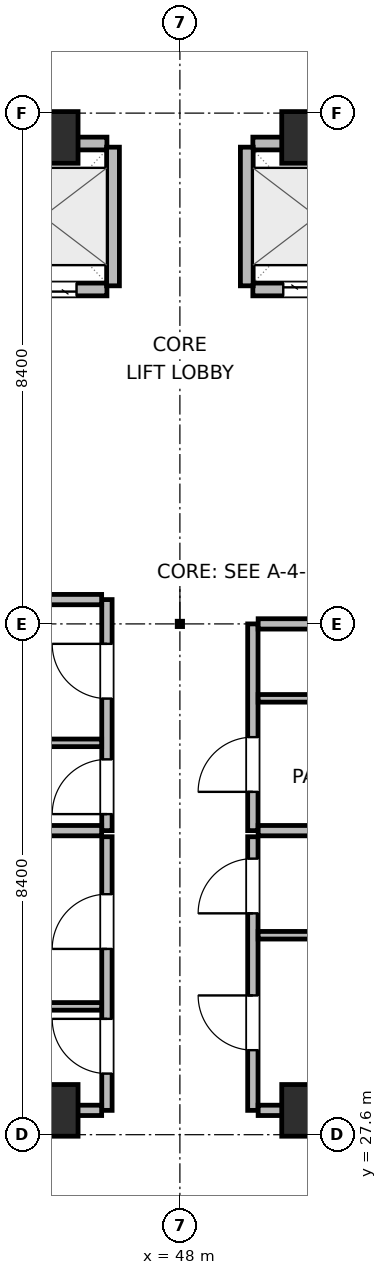
"""IFC4 building model, lengths in metres.
Left out: names, types, materials, properties, quantities, classifications, styles, units other than length and angle.
Written with IfcOpenShell. Run it as: python <this file> out.ifc"""

import sys

from ifc_helpers import new_model, si_unit, direction, frame, frame_2d, origin, origin_2d, place, context, subcontext, project, spatial, rectangle, extrude, element, fill, save


model = new_model("IFC4")
c1 = context("Model", 3, precision=1e-05, world=origin(), true_north=direction((0.0, 1.0)))
c2 = subcontext(c1, "Body", "Model", "MODEL_VIEW")
j1 = project(units=[si_unit("LENGTHUNIT", "METRE"), si_unit("PLANEANGLEUNIT", "RADIAN")], contexts=[c1])
p1 = place(None, origin())
s1 = spatial("IfcSite", under=j1, at=p1, CompositionType="ELEMENT")
p2 = place(p1, origin())
s2 = spatial("IfcBuilding", under=s1, at=p2, CompositionType="ELEMENT")
p3 = place(p2, frame((0.0, 0.0, 170.1)))
s3 = spatial("IfcBuildingStorey", under=s2, at=p3, CompositionType="ELEMENT", Elevation=170.1)
for number, where, z_axis, x_axis in (
    (1, (45.9, 28.0, 0.0), (0.0, 0.0, 1.0), (1.0, 0.0, 0.0)),
    (2, (50.1, 28.0, 0.0), (0.0, 0.0, 1.0), (1.0, 0.0, 0.0)),
    (3, (45.9, 44.0, 0.0), (0.0, 0.0, 1.0), (1.0, 0.0, 0.0)),
    (4, (50.1, 44.0, 0.0), (0.0, 0.0, 1.0), (1.0, 0.0, 0.0)),
):
    element("IfcColumn", number, at=place(p3, frame(where, z_axis=z_axis, x_axis=x_axis)), inside=s3, PredefinedType="COLUMN", context=c2, shape_type="SweptSolid", body=[
        extrude(rectangle(XDim=0.85, YDim=0.85, at=origin_2d()), origin(), (0.0, 0.0, 1.0), 3.9),
    ])
p4 = place(p3, frame((44.7, 41.5, 0.0), z_axis=(0.0, 0.0, 1.0), x_axis=(1.0, 0.0, 0.0)))
e5 = element("IfcWall", 5, at=p4, inside=s3, PredefinedType="PARTITIONING", context=c2, shape_type="SweptSolid", body=[
    extrude(rectangle(XDim=2.1, YDim=0.21, at=frame_2d((1.05, 0.0))), origin(), (0.0, 0.0, 1.0), 3.68),
])
p5 = place(p4, frame((0.5, 0.0, 0.0)))
e6 = element("IfcOpeningElement", 6, at=p5, cuts=e5, PredefinedType="OPENING", context=c2, shape_type="SweptSolid", body=[
    extrude(rectangle(XDim=1.1, YDim=2.04, at=frame_2d((0.55, 1.02))), frame((0.0, 0.115, 0.0), z_axis=(0.0, -1.0, 0.0), x_axis=(1.0, 0.0, 0.0)), (0.0, 0.0, 1.0), 0.23),
])
p6 = place(p3, frame((44.7, 43.9, 0.0), z_axis=(0.0, 0.0, 1.0), x_axis=(1.0, 0.0, 0.0)))
e7 = element("IfcWall", 7, at=p6, inside=s3, PredefinedType="PARTITIONING", context=c2, shape_type="SweptSolid", body=[
    extrude(rectangle(XDim=2.1, YDim=0.21, at=frame_2d((1.05, 0.0))), origin(), (0.0, 0.0, 1.0), 2.765),
])
p7 = place(p3, frame((46.9, 41.56, 0.0), z_axis=(0.0, 0.0, 1.0), x_axis=(0.0, 1.0, 0.0)))
e8 = element("IfcWall", 8, at=p7, inside=s3, PredefinedType="PARTITIONING", context=c2, shape_type="SweptSolid", body=[
    extrude(rectangle(XDim=2.28, YDim=0.21, at=frame_2d((1.14, 0.0))), origin(), (0.0, 0.0, 1.0), 3.68),
])
p8 = place(p3, frame((49.2, 41.5, 0.0), z_axis=(0.0, 0.0, 1.0), x_axis=(1.0, 0.0, 0.0)))
e9 = element("IfcWall", 9, at=p8, inside=s3, PredefinedType="PARTITIONING", context=c2, shape_type="SweptSolid", body=[
    extrude(rectangle(XDim=2.1, YDim=0.21, at=frame_2d((1.05, 0.0))), origin(), (0.0, 0.0, 1.0), 3.68),
])
p9 = place(p8, frame((0.5, 0.0, 0.0)))
e10 = element("IfcOpeningElement", 10, at=p9, cuts=e9, PredefinedType="OPENING", context=c2, shape_type="SweptSolid", body=[
    extrude(rectangle(XDim=1.1, YDim=2.04, at=frame_2d((0.55, 1.02))), frame((0.0, 0.115, 0.0), z_axis=(0.0, -1.0, 0.0), x_axis=(1.0, 0.0, 0.0)), (0.0, 0.0, 1.0), 0.23),
])
p10 = place(p3, frame((49.2, 43.9, 0.0), z_axis=(0.0, 0.0, 1.0), x_axis=(1.0, 0.0, 0.0)))
e11 = element("IfcWall", 11, at=p10, inside=s3, PredefinedType="PARTITIONING", context=c2, shape_type="SweptSolid", body=[
    extrude(rectangle(XDim=2.1, YDim=0.21, at=frame_2d((1.05, 0.0))), origin(), (0.0, 0.0, 1.0), 2.765),
])
p11 = place(p3, frame((49.1, 41.56, 0.0), z_axis=(0.0, 0.0, 1.0), x_axis=(0.0, 1.0, 0.0)))
e12 = element("IfcWall", 12, at=p11, inside=s3, PredefinedType="PARTITIONING", context=c2, shape_type="SweptSolid", body=[
    extrude(rectangle(XDim=2.28, YDim=0.21, at=frame_2d((1.14, 0.0))), origin(), (0.0, 0.0, 1.0), 3.68),
])
p12 = place(p3, frame((46.8, 32.6, 0.0), z_axis=(0.0, 0.0, 1.0), x_axis=(0.0, 1.0, 0.0)))
e13 = element("IfcWall", 13, at=p12, inside=s3, PredefinedType="PARTITIONING", context=c2, shape_type="SweptSolid", body=[
    extrude(rectangle(XDim=3.8, YDim=0.17, at=frame_2d((1.9, 0.0))), origin(), (0.0, 0.0, 1.0), 3.68),
])
p13 = place(p12, frame((0.272, 0.0, 0.0)))
e14 = element("IfcOpeningElement", 14, at=p13, cuts=e13, PredefinedType="OPENING", context=c2, shape_type="SweptSolid", body=[
    extrude(rectangle(XDim=0.9, YDim=2.02, at=frame_2d((0.45, 1.01))), frame((0.0, 0.095, 0.0), z_axis=(0.0, -1.0, 0.0), x_axis=(1.0, 0.0, 0.0)), (0.0, 0.0, 1.0), 0.19),
])
p14 = place(p12, frame((2.172, 0.0, 0.0)))
e15 = element("IfcOpeningElement", 15, at=p14, cuts=e13, PredefinedType="OPENING", context=c2, shape_type="SweptSolid", body=[
    extrude(rectangle(XDim=0.9, YDim=2.02, at=frame_2d((0.45, 1.01))), frame((0.0, 0.095, 0.0), z_axis=(0.0, -1.0, 0.0), x_axis=(1.0, 0.0, 0.0)), (0.0, 0.0, 1.0), 0.19),
])
for number, where, z_axis, x_axis in (
    (16, (43.8, 32.6, 0.0), (0.0, 0.0, 1.0), (1.0, 0.0, 0.0)),
    (17, (43.8, 36.4, 0.0), (0.0, 0.0, 1.0), (1.0, 0.0, 0.0)),
):
    element("IfcWall", number, at=place(p3, frame(where, z_axis=z_axis, x_axis=x_axis)), inside=s3, PredefinedType="PARTITIONING", context=c2, shape_type="SweptSolid", body=[
        extrude(rectangle(XDim=2.913, YDim=0.17, at=frame_2d((1.457, 0.0))), origin(), (0.0, 0.0, 1.0), 3.68),
    ])
p15 = place(p3, frame((43.8, 34.044, 0.0), z_axis=(0.0, 0.0, 1.0), x_axis=(1.0, 0.0, 0.0)))
e18 = element("IfcWall", 18, at=p15, inside=s3, PredefinedType="PARTITIONING", context=c2, shape_type="SweptSolid", body=[
    extrude(rectangle(XDim=2.913, YDim=0.125, at=frame_2d((1.457, 0.0))), origin(), (0.0, 0.0, 1.0), 3.68),
])
p16 = place(p3, frame((49.2, 32.6, 0.0), z_axis=(0.0, 0.0, 1.0), x_axis=(0.0, 1.0, 0.0)))
e19 = element("IfcWall", 19, at=p16, inside=s3, PredefinedType="PARTITIONING", context=c2, shape_type="SweptSolid", body=[
    extrude(rectangle(XDim=3.4, YDim=0.17, at=frame_2d((1.7, 0.0))), origin(), (0.0, 0.0, 1.0), 3.68),
])
p17 = place(p16, frame((0.638, 0.0, 0.0)))
e20 = element("IfcOpeningElement", 20, at=p17, cuts=e19, PredefinedType="OPENING", context=c2, shape_type="SweptSolid", body=[
    extrude(rectangle(XDim=0.9, YDim=2.02, at=frame_2d((0.45, 1.01))), frame((0.0, 0.095, 0.0), z_axis=(0.0, -1.0, 0.0), x_axis=(1.0, 0.0, 0.0)), (0.0, 0.0, 1.0), 0.19),
])
for number, where, z_axis, x_axis in (
    (21, (49.287, 32.6, 0.0), (0.0, 0.0, 1.0), (1.0, 0.0, 0.0)),
    (22, (49.287, 36.0, 0.0), (0.0, 0.0, 1.0), (1.0, 0.0, 0.0)),
):
    element("IfcWall", number, at=place(p3, frame(where, z_axis=z_axis, x_axis=x_axis)), inside=s3, PredefinedType="PARTITIONING", context=c2, shape_type="SweptSolid", body=[
        extrude(rectangle(XDim=2.913, YDim=0.17, at=frame_2d((1.457, 0.0))), origin(), (0.0, 0.0, 1.0), 3.68),
    ])
p18 = place(p3, frame((49.287, 34.776, 0.0), z_axis=(0.0, 0.0, 1.0), x_axis=(1.0, 0.0, 0.0)))
e23 = element("IfcWall", 23, at=p18, inside=s3, PredefinedType="PARTITIONING", context=c2, shape_type="SweptSolid", body=[
    extrude(rectangle(XDim=2.913, YDim=0.125, at=frame_2d((1.457, 0.0))), origin(), (0.0, 0.0, 1.0), 3.68),
])
p19 = place(p3, frame((46.8, 28.0, 0.0), z_axis=(0.0, 0.0, 1.0), x_axis=(0.0, 1.0, 0.0)))
e24 = element("IfcWall", 24, at=p19, inside=s3, PredefinedType="PARTITIONING", context=c2, shape_type="SweptSolid", body=[
    extrude(rectangle(XDim=4.5, YDim=0.17, at=frame_2d((2.25, 0.0))), origin(), (0.0, 0.0, 1.0), 3.68),
])
p20 = place(p19, frame((0.605, 0.0, 0.0)))
e25 = element("IfcOpeningElement", 25, at=p20, cuts=e24, PredefinedType="OPENING", context=c2, shape_type="SweptSolid", body=[
    extrude(rectangle(XDim=0.9, YDim=2.02, at=frame_2d((0.45, 1.01))), frame((0.0, 0.095, 0.0), z_axis=(0.0, -1.0, 0.0), x_axis=(1.0, 0.0, 0.0)), (0.0, 0.0, 1.0), 0.19),
])
p21 = place(p19, frame((2.655, 0.0, 0.0)))
e26 = element("IfcOpeningElement", 26, at=p21, cuts=e24, PredefinedType="OPENING", context=c2, shape_type="SweptSolid", body=[
    extrude(rectangle(XDim=0.9, YDim=2.02, at=frame_2d((0.45, 1.01))), frame((0.0, 0.095, 0.0), z_axis=(0.0, -1.0, 0.0), x_axis=(1.0, 0.0, 0.0)), (0.0, 0.0, 1.0), 0.19),
])
p22 = place(p3, frame((42.5, 28.0, 0.0), z_axis=(0.0, 0.0, 1.0), x_axis=(1.0, 0.0, 0.0)))
e27 = element("IfcWall", 27, at=p22, inside=s3, PredefinedType="PARTITIONING", context=c2, shape_type="SweptSolid", body=[
    extrude(rectangle(XDim=4.213, YDim=0.17, at=frame_2d((2.106, 0.0))), origin(), (0.0, 0.0, 1.0), 2.765),
])
p23 = place(p3, frame((42.5, 29.71, 0.0), z_axis=(0.0, 0.0, 1.0), x_axis=(1.0, 0.0, 0.0)))
e28 = element("IfcWall", 28, at=p23, inside=s3, PredefinedType="PARTITIONING", context=c2, shape_type="SweptSolid", body=[
    extrude(rectangle(XDim=4.213, YDim=0.125, at=frame_2d((2.106, 0.0))), origin(), (0.0, 0.0, 1.0), 3.68),
])
p24 = place(p3, frame((49.2, 28.0, 0.0), z_axis=(0.0, 0.0, 1.0), x_axis=(0.0, 1.0, 0.0)))
e29 = element("IfcWall", 29, at=p24, inside=s3, PredefinedType="PARTITIONING", context=c2, shape_type="SweptSolid", body=[
    extrude(rectangle(XDim=4.5, YDim=0.17, at=frame_2d((2.25, 0.0))), origin(), (0.0, 0.0, 1.0), 3.68),
])
p25 = place(p24, frame((0.99, 0.0, 0.0)))
e30 = element("IfcOpeningElement", 30, at=p25, cuts=e29, PredefinedType="OPENING", context=c2, shape_type="SweptSolid", body=[
    extrude(rectangle(XDim=0.9, YDim=2.02, at=frame_2d((0.45, 1.01))), frame((0.0, 0.095, 0.0), z_axis=(0.0, -1.0, 0.0), x_axis=(1.0, 0.0, 0.0)), (0.0, 0.0, 1.0), 0.19),
])
p26 = place(p24, frame((3.24, 0.0, 0.0)))
e31 = element("IfcOpeningElement", 31, at=p26, cuts=e29, PredefinedType="OPENING", context=c2, shape_type="SweptSolid", body=[
    extrude(rectangle(XDim=0.9, YDim=2.02, at=frame_2d((0.45, 1.01))), frame((0.0, 0.095, 0.0), z_axis=(0.0, -1.0, 0.0), x_axis=(1.0, 0.0, 0.0)), (0.0, 0.0, 1.0), 0.19),
])
p27 = place(p3, frame((49.287, 28.0, 0.0), z_axis=(0.0, 0.0, 1.0), x_axis=(1.0, 0.0, 0.0)))
e32 = element("IfcWall", 32, at=p27, inside=s3, PredefinedType="PARTITIONING", context=c2, shape_type="SweptSolid", body=[
    extrude(rectangle(XDim=4.213, YDim=0.17, at=frame_2d((2.106, 0.0))), origin(), (0.0, 0.0, 1.0), 2.765),
])
p28 = place(p3, frame((49.287, 30.88, 0.0), z_axis=(0.0, 0.0, 1.0), x_axis=(1.0, 0.0, 0.0)))
e33 = element("IfcWall", 33, at=p28, inside=s3, PredefinedType="PARTITIONING", context=c2, shape_type="SweptSolid", body=[
    extrude(rectangle(XDim=4.213, YDim=0.125, at=frame_2d((2.106, 0.0))), origin(), (0.0, 0.0, 1.0), 3.68),
])
p29 = place(p5, origin())
e34 = element("IfcDoor", 34, at=p29, inside=s3, OperationType="DOUBLE_DOOR_SLIDING", PredefinedType="DOOR", context=c2, shape_type="SweptSolid", body=[
    extrude(rectangle(XDim=1.1, YDim=2.04, at=frame_2d((0.55, 1.02))), frame((0.0, 0.025, 0.0), z_axis=(0.0, -1.0, 0.0), x_axis=(1.0, 0.0, 0.0)), (0.0, 0.0, 1.0), 0.05),
])
fill(e6, e34)
p30 = place(p9, origin())
e35 = element("IfcDoor", 35, at=p30, inside=s3, OperationType="DOUBLE_DOOR_SLIDING", PredefinedType="DOOR", context=c2, shape_type="SweptSolid", body=[
    extrude(rectangle(XDim=1.1, YDim=2.04, at=frame_2d((0.55, 1.02))), frame((0.0, 0.025, 0.0), z_axis=(0.0, -1.0, 0.0), x_axis=(1.0, 0.0, 0.0)), (0.0, 0.0, 1.0), 0.05),
])
fill(e10, e35)
p31 = place(p13, origin())
e36 = element("IfcDoor", 36, at=p31, inside=s3, OperationType="SINGLE_SWING_LEFT", PredefinedType="DOOR", context=c2, shape_type="SweptSolid", body=[
    extrude(rectangle(XDim=0.9, YDim=2.02, at=frame_2d((0.45, 1.01))), frame((0.0, 0.025, 0.0), z_axis=(0.0, -1.0, 0.0), x_axis=(1.0, 0.0, 0.0)), (0.0, 0.0, 1.0), 0.05),
])
fill(e14, e36)
p32 = place(p14, origin())
e37 = element("IfcDoor", 37, at=p32, inside=s3, OperationType="SINGLE_SWING_RIGHT", PredefinedType="DOOR", context=c2, shape_type="SweptSolid", body=[
    extrude(rectangle(XDim=0.9, YDim=2.02, at=frame_2d((0.45, 1.01))), frame((0.0, 0.025, 0.0), z_axis=(0.0, -1.0, 0.0), x_axis=(1.0, 0.0, 0.0)), (0.0, 0.0, 1.0), 0.05),
])
fill(e15, e37)
p33 = place(p17, origin())
e38 = element("IfcDoor", 38, at=p33, inside=s3, OperationType="SINGLE_SWING_LEFT", PredefinedType="DOOR", context=c2, shape_type="SweptSolid", body=[
    extrude(rectangle(XDim=0.9, YDim=2.02, at=frame_2d((0.45, 1.01))), frame((0.0, 0.025, 0.0), z_axis=(0.0, -1.0, 0.0), x_axis=(1.0, 0.0, 0.0)), (0.0, 0.0, 1.0), 0.05),
])
fill(e20, e38)
p34 = place(p20, origin())
e39 = element("IfcDoor", 39, at=p34, inside=s3, OperationType="SINGLE_SWING_RIGHT", PredefinedType="DOOR", context=c2, shape_type="SweptSolid", body=[
    extrude(rectangle(XDim=0.9, YDim=2.02, at=frame_2d((0.45, 1.01))), frame((0.0, 0.025, 0.0), z_axis=(0.0, -1.0, 0.0), x_axis=(1.0, 0.0, 0.0)), (0.0, 0.0, 1.0), 0.05),
])
fill(e25, e39)
p35 = place(p21, origin())
e40 = element("IfcDoor", 40, at=p35, inside=s3, OperationType="SINGLE_SWING_LEFT", PredefinedType="DOOR", context=c2, shape_type="SweptSolid", body=[
    extrude(rectangle(XDim=0.9, YDim=2.02, at=frame_2d((0.45, 1.01))), frame((0.0, 0.025, 0.0), z_axis=(0.0, -1.0, 0.0), x_axis=(1.0, 0.0, 0.0)), (0.0, 0.0, 1.0), 0.05),
])
fill(e26, e40)
p36 = place(p25, origin())
e41 = element("IfcDoor", 41, at=p36, inside=s3, OperationType="SINGLE_SWING_RIGHT", PredefinedType="DOOR", context=c2, shape_type="SweptSolid", body=[
    extrude(rectangle(XDim=0.9, YDim=2.02, at=frame_2d((0.45, 1.01))), frame((0.0, 0.025, 0.0), z_axis=(0.0, -1.0, 0.0), x_axis=(1.0, 0.0, 0.0)), (0.0, 0.0, 1.0), 0.05),
])
fill(e30, e41)
p37 = place(p26, origin())
e42 = element("IfcDoor", 42, at=p37, inside=s3, OperationType="SINGLE_SWING_LEFT", PredefinedType="DOOR", context=c2, shape_type="SweptSolid", body=[
    extrude(rectangle(XDim=0.9, YDim=2.02, at=frame_2d((0.45, 1.01))), frame((0.0, 0.025, 0.0), z_axis=(0.0, -1.0, 0.0), x_axis=(1.0, 0.0, 0.0)), (0.0, 0.0, 1.0), 0.05),
])
fill(e31, e42)
save(model, sys.argv[1])
